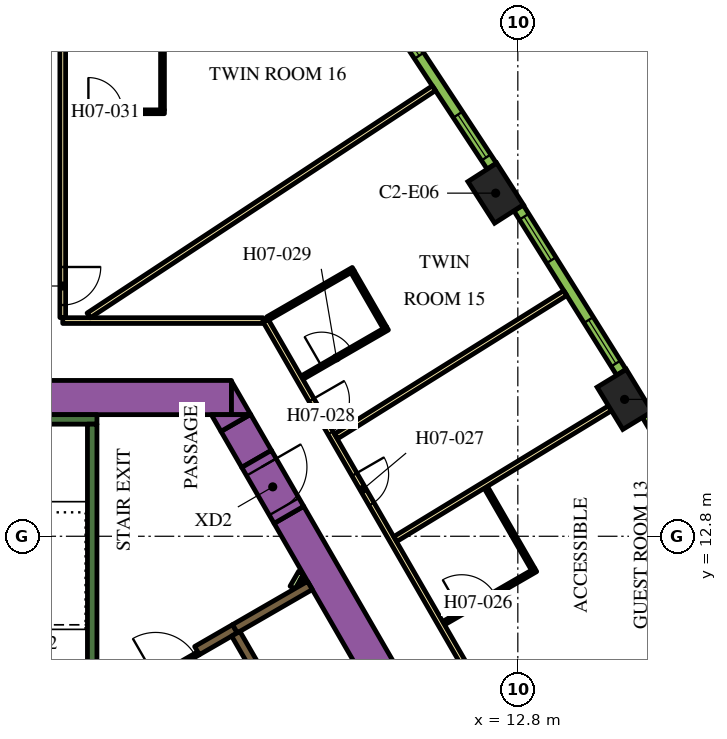
"""IFC4 building model, lengths in metres.
Left out: names, types, materials, properties, quantities, classifications, styles, units other than length and angle.
Written with IfcOpenShell. Run it as: python <this file> out.ifc"""

import sys

from ifc_helpers import new_model, si_unit, direction, frame, frame_2d, origin, origin_2d, place, context, subcontext, project, spatial, polyline, rectangle, outline, extrude, element, fill, save


model = new_model("IFC4")
c1 = context("Model", 3, precision=1e-05, world=origin(), true_north=direction((0.0, 1.0)))
c2 = subcontext(c1, "Body", "Model", "MODEL_VIEW")
j1 = project(units=[si_unit("LENGTHUNIT", "METRE"), si_unit("PLANEANGLEUNIT", "RADIAN")], contexts=[c1])
p1 = place(None, origin())
s1 = spatial("IfcSite", under=j1, at=p1, CompositionType="ELEMENT")
p2 = place(p1, origin())
s2 = spatial("IfcBuilding", under=s1, at=p2, CompositionType="ELEMENT")
p3 = place(p2, frame((0.0, 0.0, 99.3)))
s3 = spatial("IfcBuildingStorey", under=s2, at=p3, CompositionType="ELEMENT", Elevation=99.3)
for number, where, z_axis, x_axis in (
    (1, (15.609, 16.402, 0.0), (0.0, 0.0, 1.0), (-0.52, 0.854, 0.0)),
    (2, (12.217, 21.828, 0.0), (0.0, 0.0, 1.0), (-0.54, 0.842, 0.0)),
):
    element("IfcColumn", number, at=place(p3, frame(where, z_axis=z_axis, x_axis=x_axis)), inside=s3, PredefinedType="COLUMN", context=c2, shape_type="SweptSolid", body=[
        extrude(rectangle(XDim=1.3, YDim=0.9, at=origin_2d()), origin(), (0.0, 0.0, 1.0), 3.9),
    ])
p4 = place(p3, frame((6.776, 13.364, 0.0), z_axis=(0.0, 0.0, 1.0), x_axis=(0.500004177138, -0.8660229921, 0.0)))
e3 = element("IfcWall", 3, at=p4, inside=s3, PredefinedType="SOLIDWALL", context=c2, shape_type="SweptSolid", body=[
    extrude(rectangle(XDim=20.204, YDim=0.9, at=frame_2d((10.102, 0.0))), origin(), (0.0, 0.0, 1.0), 3.9),
])
p5 = place(p3, frame((-4.224, 16.45, 0.0), z_axis=(0.0, 0.0, 1.0), x_axis=(1.0, 0.0, 0.0)))
e4 = element("IfcWall", 4, at=p5, inside=s3, PredefinedType="SOLIDWALL", context=c2, shape_type="SweptSolid", body=[
    extrude(rectangle(XDim=9.488, YDim=0.9, at=frame_2d((4.744, 0.0))), origin(), (0.0, 0.0, 1.0), 3.9),
])
p6 = place(p3, origin())
e5 = element("IfcWall", 5, at=p6, inside=s3, PredefinedType="SOLIDWALL", context=c2, shape_type="SweptSolid", body=[
    extrude(outline(polyline([(5.265, 16.0), (5.265, 16.88), (5.773, 16.0), (5.265, 16.0)])), origin(), (0.0, 0.0, 1.0), 3.9),
])
p7 = place(p3, frame((5.926, 14.836, 0.0), z_axis=(0.0, 0.0, 1.0), x_axis=(-0.500076735116, 0.865981096212, 0.0)))
e6 = element("IfcWall", 6, at=p7, inside=s3, PredefinedType="SOLIDWALL", context=c2, shape_type="SweptSolid", body=[
    extrude(rectangle(XDim=1.094, YDim=0.9, at=frame_2d((0.547, 0.0))), origin(), (0.0, 0.0, 1.0), 3.9),
])
e7 = element("IfcWall", 7, at=p6, inside=s3, PredefinedType="SOLIDWALL", context=c2, shape_type="SweptSolid", body=[
    extrude(outline(polyline([(4.734, 16.0), (5.75, 16.0), (4.988, 15.56), (4.734, 16.0)])), origin(), (0.0, 0.0, 1.0), 3.9),
])
p8 = place(p3, frame((-1.725, 15.875, 0.0), z_axis=(0.0, 0.0, 1.0), x_axis=(1.0, 0.0, 0.0)))
e8 = element("IfcWall", 8, at=p8, inside=s3, PredefinedType="SOLIDWALL", context=c2, shape_type="SweptSolid", body=[
    extrude(rectangle(XDim=3.45, YDim=0.25, at=frame_2d((1.725, 0.0))), origin(), (0.0, 0.0, 1.0), 3.9),
])
p9 = place(p3, frame((1.6, 8.95, 0.0), z_axis=(0.0, 0.0, 1.0), x_axis=(0.0, 1.0, 0.0)))
e9 = element("IfcWall", 9, at=p9, inside=s3, PredefinedType="SOLIDWALL", context=c2, shape_type="SweptSolid", body=[
    extrude(rectangle(XDim=6.8, YDim=0.25, at=frame_2d((3.4, 0.0))), origin(), (0.0, 0.0, 1.0), 3.9),
])
p10 = place(p3, frame((4.358, 9.791, 0.0), z_axis=(0.0, 0.0, 1.0), x_axis=(0.866079547155, 0.499906209203, 0.0)))
e10 = element("IfcWall", 10, at=p10, inside=s3, PredefinedType="SOLIDWALL", context=c2, shape_type="SweptSolid", body=[
    extrude(rectangle(XDim=1.15, YDim=0.25, at=frame_2d((0.575, 0.0))), origin(), (0.0, 0.0, 1.0), 3.9),
])
p11 = place(p3, frame((5.356, 10.367, 0.0), z_axis=(0.0, 0.0, 1.0), x_axis=(0.865978535641, 0.50008116922, 0.0)))
e11 = element("IfcWall", 11, at=p11, inside=s3, PredefinedType="SOLIDWALL", context=c2, shape_type="SweptSolid", body=[
    extrude(rectangle(XDim=2.278, YDim=0.25, at=frame_2d((1.139, 0.0))), origin(), (0.0, 0.0, 1.0), 3.9),
])
p12 = place(p3, frame((6.872, 11.45, 0.0), z_axis=(0.0, 0.0, 1.0), x_axis=(0.499846793097, 0.866113839764, 0.0)))
e12 = element("IfcWall", 12, at=p12, inside=s3, PredefinedType="PARTITIONING", context=c2, shape_type="SweptSolid", body=[
    extrude(rectangle(XDim=0.453, YDim=0.15, at=frame_2d((0.227, 0.0))), origin(), (0.0, 0.0, 1.0), 2.75),
])
p13 = place(p3, frame((7.131, 11.6, 0.0), z_axis=(0.0, 0.0, 1.0), x_axis=(0.498600033135, 0.866832167699, 0.0)))
e13 = element("IfcWall", 13, at=p13, inside=s3, PredefinedType="PARTITIONING", context=c2, shape_type="SweptSolid", body=[
    extrude(rectangle(XDim=0.107, YDim=0.15, at=frame_2d((0.053, 0.0))), origin(), (0.0, 0.0, 1.0), 2.75),
])
p14 = place(p3, frame((11.553, -0.46, 0.0), z_axis=(0.0, 0.0, 1.0), x_axis=(-0.500006514828, 0.866021642414, 0.0)))
e14 = element("IfcWall", 14, at=p14, inside=s3, PredefinedType="SOLIDWALL", context=c2, shape_type="SweptSolid", body=[
    extrude(rectangle(XDim=12.35, YDim=0.25, at=frame_2d((6.175, 0.0))), origin(), (0.0, 0.0, 1.0), 3.9),
])
p15 = place(p14, frame((0.585, 0.0, 0.0)))
e15 = element("IfcOpeningElement", 15, at=p15, cuts=e14, PredefinedType="OPENING", context=c2, shape_type="SweptSolid", body=[
    extrude(rectangle(XDim=1.1, YDim=2.1, at=frame_2d((0.55, 1.05))), frame((0.0, 0.135, 0.0), z_axis=(0.0, -1.0, 0.0), x_axis=(1.0, 0.0, 0.0)), (0.0, 0.0, 1.0), 0.27),
])
p16 = place(p14, frame((3.105, 0.0, 0.0)))
e16 = element("IfcOpeningElement", 16, at=p16, cuts=e14, PredefinedType="OPENING", context=c2, shape_type="SweptSolid", body=[
    extrude(rectangle(XDim=1.1, YDim=2.1, at=frame_2d((0.55, 1.05))), frame((0.0, 0.135, 0.0), z_axis=(0.0, -1.0, 0.0), x_axis=(1.0, 0.0, 0.0)), (0.0, 0.0, 1.0), 0.27),
])
p17 = place(p14, frame((5.625, 0.0, 0.0)))
e17 = element("IfcOpeningElement", 17, at=p17, cuts=e14, PredefinedType="OPENING", context=c2, shape_type="SweptSolid", body=[
    extrude(rectangle(XDim=1.1, YDim=2.1, at=frame_2d((0.55, 1.05))), frame((0.0, 0.135, 0.0), z_axis=(0.0, -1.0, 0.0), x_axis=(1.0, 0.0, 0.0)), (0.0, 0.0, 1.0), 0.27),
])
p18 = place(p3, frame((3.183, 9.02, 0.0), z_axis=(0.0, 0.0, 1.0), x_axis=(0.866034573852, 0.49998411664, 0.0)))
e18 = element("IfcWall", 18, at=p18, inside=s3, PredefinedType="PARTITIONING", context=c2, shape_type="SweptSolid", body=[
    extrude(rectangle(XDim=1.4, YDim=0.09, at=frame_2d((0.7, 0.0))), origin(), (0.0, 0.0, 1.0), 2.75),
])
p19 = place(p18, frame((0.1, 0.0, 0.0)))
e19 = element("IfcOpeningElement", 19, at=p19, cuts=e18, PredefinedType="OPENING", context=c2, shape_type="SweptSolid", body=[
    extrude(rectangle(XDim=1.2, YDim=2.1, at=frame_2d((0.6, 1.05))), frame((0.0, 0.055, 0.0), z_axis=(0.0, -1.0, 0.0), x_axis=(1.0, 0.0, 0.0)), (0.0, 0.0, 1.0), 0.11),
])
p20 = place(p3, frame((5.926, 14.836, 0.0), z_axis=(0.0, 0.0, 1.0), x_axis=(0.500062241894, -0.865989465428, 0.0)))
e20 = element("IfcWall", 20, at=p20, inside=s3, PredefinedType="SOLIDWALL", context=c2, shape_type="SweptSolid", body=[
    extrude(rectangle(XDim=1.7, YDim=0.9, at=frame_2d((0.85, 0.0))), origin(), (0.0, 0.0, 1.0), 3.9),
])
p21 = place(p20, frame((0.25, 0.0, 0.0)))
e21 = element("IfcOpeningElement", 21, at=p21, cuts=e20, PredefinedType="OPENING", context=c2, shape_type="SweptSolid", body=[
    extrude(rectangle(XDim=1.2, YDim=2.1, at=frame_2d((0.6, 1.05))), frame((0.0, 0.46, 0.0), z_axis=(0.0, -1.0, 0.0), x_axis=(1.0, 0.0, 0.0)), (0.0, 0.0, 1.0), 0.92),
])
p22 = place(p3, frame((6.163, 18.475, 0.0), z_axis=(0.0, 0.0, 1.0), x_axis=(0.500001317485, -0.866024643133, 0.0)))
e22 = element("IfcWall", 22, at=p22, inside=s3, PredefinedType="PARTITIONING", context=c2, shape_type="SweptSolid", body=[
    extrude(rectangle(XDim=25.767, YDim=0.15, at=frame_2d((12.883, 0.0))), origin(), (0.0, 0.0, 1.0), 2.75),
])
p23 = place(p22, frame((24.241, 0.0, 0.0)))
e23 = element("IfcOpeningElement", 23, at=p23, cuts=e22, PredefinedType="OPENING", context=c2, shape_type="SweptSolid", body=[
    extrude(rectangle(XDim=1.0, YDim=2.1, at=frame_2d((0.5, 1.05))), frame((0.0, 0.085, 0.0), z_axis=(0.0, -1.0, 0.0), x_axis=(1.0, 0.0, 0.0)), (0.0, 0.0, 1.0), 0.17),
])
p24 = place(p22, frame((13.144, 0.0, 0.0)))
e24 = element("IfcOpeningElement", 24, at=p24, cuts=e22, PredefinedType="OPENING", context=c2, shape_type="SweptSolid", body=[
    extrude(rectangle(XDim=1.0, YDim=2.1, at=frame_2d((0.5, 1.05))), frame((0.0, 0.085, 0.0), z_axis=(0.0, -1.0, 0.0), x_axis=(1.0, 0.0, 0.0)), (0.0, 0.0, 1.0), 0.17),
])
p25 = place(p22, frame((11.592, 0.0, 0.0)))
e25 = element("IfcOpeningElement", 25, at=p25, cuts=e22, PredefinedType="OPENING", context=c2, shape_type="SweptSolid", body=[
    extrude(rectangle(XDim=1.1, YDim=2.1, at=frame_2d((0.55, 1.05))), frame((0.0, 0.085, 0.0), z_axis=(0.0, -1.0, 0.0), x_axis=(1.0, 0.0, 0.0)), (0.0, 0.0, 1.0), 0.17),
])
p26 = place(p22, frame((4.674, 0.0, 0.0)))
e26 = element("IfcOpeningElement", 26, at=p26, cuts=e22, PredefinedType="OPENING", context=c2, shape_type="SweptSolid", body=[
    extrude(rectangle(XDim=0.9, YDim=2.1, at=frame_2d((0.45, 1.05))), frame((0.0, 0.085, 0.0), z_axis=(0.0, -1.0, 0.0), x_axis=(1.0, 0.0, 0.0)), (0.0, 0.0, 1.0), 0.17),
])
p27 = place(p22, frame((2.411, 0.0, 0.0)))
e27 = element("IfcOpeningElement", 27, at=p27, cuts=e22, PredefinedType="OPENING", context=c2, shape_type="SweptSolid", body=[
    extrude(rectangle(XDim=1.0, YDim=2.1, at=frame_2d((0.5, 1.05))), frame((0.0, 0.085, 0.0), z_axis=(0.0, -1.0, 0.0), x_axis=(1.0, 0.0, 0.0)), (0.0, 0.0, 1.0), 0.17),
])
p28 = place(p3, frame((0.825, 18.475, 0.0), z_axis=(0.0, 0.0, 1.0), x_axis=(1.0, 0.0, 0.0)))
e28 = element("IfcWall", 28, at=p28, inside=s3, PredefinedType="PARTITIONING", context=c2, shape_type="SweptSolid", body=[
    extrude(rectangle(XDim=5.268, YDim=0.15, at=frame_2d((2.634, 0.0))), origin(), (0.0, 0.0, 1.0), 2.75),
])
p29 = place(p3, frame((0.825, 32.098, 0.0), z_axis=(0.0, 0.0, 1.0), x_axis=(0.0, -1.0, 0.0)))
e29 = element("IfcWall", 29, at=p29, inside=s3, PredefinedType="PARTITIONING", context=c2, shape_type="SweptSolid", body=[
    extrude(rectangle(XDim=13.543, YDim=0.15, at=frame_2d((6.772, 0.0))), origin(), (0.0, 0.0, 1.0), 2.75),
])
p30 = place(p29, frame((12.213, 0.0, 0.0)))
e30 = element("IfcOpeningElement", 30, at=p30, cuts=e29, PredefinedType="OPENING", context=c2, shape_type="SweptSolid", body=[
    extrude(rectangle(XDim=1.0, YDim=2.1, at=frame_2d((0.5, 1.05))), frame((0.0, 0.085, 0.0), z_axis=(0.0, -1.0, 0.0), x_axis=(1.0, 0.0, 0.0)), (0.0, 0.0, 1.0), 0.17),
])
p31 = place(p29, frame((4.65, 0.0, 0.0)))
e31 = element("IfcOpeningElement", 31, at=p31, cuts=e29, PredefinedType="OPENING", context=c2, shape_type="SweptSolid", body=[
    extrude(rectangle(XDim=1.0, YDim=2.1, at=frame_2d((0.5, 1.05))), frame((0.0, 0.085, 0.0), z_axis=(0.0, -1.0, 0.0), x_axis=(1.0, 0.0, 0.0)), (0.0, 0.0, 1.0), 0.17),
])
p32 = place(p3, frame((10.592, 24.589, 0.0), z_axis=(0.0, 0.0, 1.0), x_axis=(-0.835337323748, -0.549737715236, 0.0)))
e32 = element("IfcWall", 32, at=p32, inside=s3, PredefinedType="PARTITIONING", context=c2, shape_type="SweptSolid", body=[
    extrude(rectangle(XDim=10.875, YDim=0.15, at=frame_2d((5.438, 0.0))), origin(), (0.0, 0.0, 1.0), 2.75),
])
p33 = place(p3, frame((14.049, 19.2, 0.0), z_axis=(0.0, 0.0, 1.0), x_axis=(-0.847955867271, -0.530066832731, 0.0)))
e33 = element("IfcWall", 33, at=p33, inside=s3, PredefinedType="PARTITIONING", context=c2, shape_type="SweptSolid", body=[
    extrude(rectangle(XDim=7.111, YDim=0.15, at=frame_2d((3.556, 0.0))), origin(), (0.0, 0.0, 1.0), 2.75),
])
p34 = place(p3, frame((15.225, 16.167, 0.0), z_axis=(0.0, 0.0, 1.0), x_axis=(-0.854088713274, -0.520127359266, 0.0)))
e34 = element("IfcWall", 34, at=p34, inside=s3, PredefinedType="PARTITIONING", context=c2, shape_type="SweptSolid", body=[
    extrude(rectangle(XDim=6.611, YDim=0.15, at=frame_2d((3.305, 0.0))), origin(), (0.0, 0.0, 1.0), 2.75),
])
p35 = place(p3, frame((18.484, 10.672, 0.0), z_axis=(0.0, 0.0, 1.0), x_axis=(-0.866019162053, -0.50001081084, 0.0)))
e35 = element("IfcWall", 35, at=p35, inside=s3, PredefinedType="PARTITIONING", context=c2, shape_type="SweptSolid", body=[
    extrude(rectangle(XDim=6.694, YDim=0.15, at=frame_2d((3.347, 0.0))), origin(), (0.0, 0.0, 1.0), 2.75),
])
p36 = place(p3, frame((10.847, 10.513, 0.0), z_axis=(0.0, 0.0, 1.0), x_axis=(0.865996816683, 0.500049511043, 0.0)))
e36 = element("IfcWall", 36, at=p36, inside=s3, PredefinedType="PARTITIONING", context=c2, shape_type="SweptSolid", body=[
    extrude(rectangle(XDim=2.8, YDim=0.1, at=frame_2d((1.4, 0.0))), origin(), (0.0, 0.0, 1.0), 2.75),
])
p37 = place(p36, frame((0.55, 0.0, 0.0)))
e37 = element("IfcOpeningElement", 37, at=p37, cuts=e36, PredefinedType="OPENING", context=c2, shape_type="SweptSolid", body=[
    extrude(rectangle(XDim=1.0, YDim=2.1, at=frame_2d((0.5, 1.05))), frame((0.0, 0.06, 0.0), z_axis=(0.0, -1.0, 0.0), x_axis=(1.0, 0.0, 0.0)), (0.0, 0.0, 1.0), 0.12),
])
p38 = place(p3, frame((13.203, 11.931, 0.0), z_axis=(0.0, 0.0, 1.0), x_axis=(-0.499988411372, 0.866032094379, 0.0)))
e38 = element("IfcWall", 38, at=p38, inside=s3, PredefinedType="PARTITIONING", context=c2, shape_type="SweptSolid", body=[
    extrude(rectangle(XDim=2.49, YDim=0.1, at=frame_2d((1.245, 0.0))), origin(), (0.0, 0.0, 1.0), 2.75),
])
p39 = place(p3, frame((7.118, 16.971, 0.0), z_axis=(0.0, 0.0, 1.0), x_axis=(0.866021400173, 0.500006934395, 0.0)))
e39 = element("IfcWall", 39, at=p39, inside=s3, PredefinedType="PARTITIONING", context=c2, shape_type="SweptSolid", body=[
    extrude(rectangle(XDim=2.6, YDim=0.1, at=frame_2d((1.3, 0.0))), origin(), (0.0, 0.0, 1.0), 2.75),
])
p40 = place(p39, frame((0.6, 0.0, 0.0)))
e40 = element("IfcOpeningElement", 40, at=p40, cuts=e39, PredefinedType="OPENING", context=c2, shape_type="SweptSolid", body=[
    extrude(rectangle(XDim=0.9, YDim=2.1, at=frame_2d((0.45, 1.05))), frame((0.0, 0.06, 0.0), z_axis=(0.0, -1.0, 0.0), x_axis=(1.0, 0.0, 0.0)), (0.0, 0.0, 1.0), 0.12),
])
p41 = place(p3, frame((9.302, 18.289, 0.0), z_axis=(0.0, 0.0, 1.0), x_axis=(-0.500062241894, 0.865989465428, 0.0)))
e41 = element("IfcWall", 41, at=p41, inside=s3, PredefinedType="PARTITIONING", context=c2, shape_type="SweptSolid", body=[
    extrude(rectangle(XDim=1.7, YDim=0.1, at=frame_2d((0.85, 0.0))), origin(), (0.0, 0.0, 1.0), 2.75),
])
p42 = place(p3, frame((6.218, 18.53, 0.0), z_axis=(0.0, 0.0, 1.0), x_axis=(0.865997922154, 0.500047596559, 0.0)))
e42 = element("IfcWall", 42, at=p42, inside=s3, PredefinedType="PARTITIONING", context=c2, shape_type="SweptSolid", body=[
    extrude(rectangle(XDim=2.6, YDim=0.1, at=frame_2d((1.3, 0.0))), origin(), (0.0, 0.0, 1.0), 2.75),
])
p43 = place(p3, frame((0.9, 23.969, 0.0), z_axis=(0.0, 0.0, 1.0), x_axis=(1.0, 0.0, 0.0)))
e43 = element("IfcWall", 43, at=p43, inside=s3, PredefinedType="PARTITIONING", context=c2, shape_type="SweptSolid", body=[
    extrude(rectangle(XDim=2.6, YDim=0.1, at=frame_2d((1.3, 0.0))), origin(), (0.0, 0.0, 1.0), 2.75),
])
p44 = place(p43, frame((0.6, 0.0, 0.0)))
e44 = element("IfcOpeningElement", 44, at=p44, cuts=e43, PredefinedType="OPENING", context=c2, shape_type="SweptSolid", body=[
    extrude(rectangle(XDim=0.9, YDim=2.1, at=frame_2d((0.45, 1.05))), frame((0.0, 0.06, 0.0), z_axis=(0.0, -1.0, 0.0), x_axis=(1.0, 0.0, 0.0)), (0.0, 0.0, 1.0), 0.12),
])
p45 = place(p3, frame((3.45, 24.019, 0.0), z_axis=(0.0, 0.0, 1.0), x_axis=(0.0, 1.0, 0.0)))
e45 = element("IfcWall", 45, at=p45, inside=s3, PredefinedType="PARTITIONING", context=c2, shape_type="SweptSolid", body=[
    extrude(rectangle(XDim=1.7, YDim=0.1, at=frame_2d((0.85, 0.0))), origin(), (0.0, 0.0, 1.0), 2.75),
])
p46 = place(p3, frame((18.805, 11.611, 0.0), z_axis=(0.0, 0.0, 1.0), x_axis=(-0.510054281659, 0.860142214847, 0.0)))
e46 = element("IfcWall", 46, at=p46, inside=s3, PredefinedType="SOLIDWALL", context=c2, shape_type="SweptSolid", body=[
    extrude(rectangle(XDim=5.101, YDim=0.29, at=frame_2d((2.55, 0.0))), origin(), (0.0, 0.0, 1.0), 3.65),
])
p47 = place(p46, frame((0.273, 0.0, 0.9)))
e47 = element("IfcOpeningElement", 47, at=p47, cuts=e46, PredefinedType="OPENING", context=c2, shape_type="SweptSolid", body=[
    extrude(rectangle(XDim=1.35, YDim=2.15, at=frame_2d((0.675, 1.075))), frame((0.0, 0.155, 0.0), z_axis=(0.0, -1.0, 0.0), x_axis=(1.0, 0.0, 0.0)), (0.0, 0.0, 1.0), 0.31),
])
p48 = place(p46, frame((3.478, 0.0, 0.9)))
e48 = element("IfcOpeningElement", 48, at=p48, cuts=e46, PredefinedType="OPENING", context=c2, shape_type="SweptSolid", body=[
    extrude(rectangle(XDim=1.35, YDim=2.15, at=frame_2d((0.675, 1.075))), frame((0.0, 0.155, 0.0), z_axis=(0.0, -1.0, 0.0), x_axis=(1.0, 0.0, 0.0)), (0.0, 0.0, 1.0), 0.31),
])
p49 = place(p3, frame((15.524, 17.114, 0.0), z_axis=(0.0, 0.0, 1.0), x_axis=(-0.530072082134, 0.847952585787, 0.0)))
e49 = element("IfcWall", 49, at=p49, inside=s3, PredefinedType="SOLIDWALL", context=c2, shape_type="SweptSolid", body=[
    extrude(rectangle(XDim=5.1, YDim=0.29, at=frame_2d((2.55, 0.0))), origin(), (0.0, 0.0, 1.0), 3.65),
])
p50 = place(p49, frame((0.273, 0.0, 0.9)))
e50 = element("IfcOpeningElement", 50, at=p50, cuts=e49, PredefinedType="OPENING", context=c2, shape_type="SweptSolid", body=[
    extrude(rectangle(XDim=1.35, YDim=2.15, at=frame_2d((0.675, 1.075))), frame((0.0, 0.155, 0.0), z_axis=(0.0, -1.0, 0.0), x_axis=(1.0, 0.0, 0.0)), (0.0, 0.0, 1.0), 0.31),
])
p51 = place(p49, frame((3.478, 0.0, 0.9)))
e51 = element("IfcOpeningElement", 51, at=p51, cuts=e49, PredefinedType="OPENING", context=c2, shape_type="SweptSolid", body=[
    extrude(rectangle(XDim=1.35, YDim=2.15, at=frame_2d((0.675, 1.075))), frame((0.0, 0.155, 0.0), z_axis=(0.0, -1.0, 0.0), x_axis=(1.0, 0.0, 0.0)), (0.0, 0.0, 1.0), 0.31),
])
p52 = place(p3, frame((12.115, 22.539, 0.0), z_axis=(0.0, 0.0, 1.0), x_axis=(-0.549741341923, 0.835334937005, 0.0)))
e52 = element("IfcWall", 52, at=p52, inside=s3, PredefinedType="SOLIDWALL", context=c2, shape_type="SweptSolid", body=[
    extrude(rectangle(XDim=5.1, YDim=0.29, at=frame_2d((2.55, 0.0))), origin(), (0.0, 0.0, 1.0), 3.65),
])
p53 = place(p52, frame((0.273, 0.0, 0.9)))
e53 = element("IfcOpeningElement", 53, at=p53, cuts=e52, PredefinedType="OPENING", context=c2, shape_type="SweptSolid", body=[
    extrude(rectangle(XDim=1.35, YDim=2.15, at=frame_2d((0.675, 1.075))), frame((0.0, 0.155, 0.0), z_axis=(0.0, -1.0, 0.0), x_axis=(1.0, 0.0, 0.0)), (0.0, 0.0, 1.0), 0.31),
])
p54 = place(p52, frame((3.478, 0.0, 0.9)))
e54 = element("IfcOpeningElement", 54, at=p54, cuts=e52, PredefinedType="OPENING", context=c2, shape_type="SweptSolid", body=[
    extrude(rectangle(XDim=1.35, YDim=2.15, at=frame_2d((0.675, 1.075))), frame((0.0, 0.155, 0.0), z_axis=(0.0, -1.0, 0.0), x_axis=(1.0, 0.0, 0.0)), (0.0, 0.0, 1.0), 0.31),
])
p55 = place(p19, origin())
e55 = element("IfcDoor", 55, at=p55, inside=s3, OperationType="SINGLE_SWING_LEFT", PredefinedType="DOOR", context=c2, shape_type="SweptSolid", body=[
    extrude(rectangle(XDim=1.2, YDim=2.1, at=frame_2d((0.6, 1.05))), frame((0.0, 0.025, 0.0), z_axis=(0.0, -1.0, 0.0), x_axis=(1.0, 0.0, 0.0)), (0.0, 0.0, 1.0), 0.05),
])
fill(e19, e55)
p56 = place(p21, origin())
e56 = element("IfcDoor", 56, at=p56, inside=s3, OperationType="SINGLE_SWING_LEFT", PredefinedType="DOOR", context=c2, shape_type="SweptSolid", body=[
    extrude(rectangle(XDim=1.2, YDim=2.1, at=frame_2d((0.6, 1.05))), frame((0.0, 0.025, 0.0), z_axis=(0.0, -1.0, 0.0), x_axis=(1.0, 0.0, 0.0)), (0.0, 0.0, 1.0), 0.05),
])
fill(e21, e56)
p57 = place(p37, origin())
e57 = element("IfcDoor", 57, at=p57, inside=s3, OperationType="SINGLE_SWING_LEFT", PredefinedType="DOOR", context=c2, shape_type="SweptSolid", body=[
    extrude(rectangle(XDim=1.0, YDim=2.1, at=frame_2d((0.5, 1.05))), frame((0.0, 0.025, 0.0), z_axis=(0.0, -1.0, 0.0), x_axis=(1.0, 0.0, 0.0)), (0.0, 0.0, 1.0), 0.05),
])
fill(e37, e57)
p58 = place(p26, origin())
e58 = element("IfcDoor", 58, at=p58, inside=s3, OperationType="SINGLE_SWING_RIGHT", PredefinedType="DOOR", context=c2, shape_type="SweptSolid", body=[
    extrude(rectangle(XDim=0.9, YDim=2.1, at=frame_2d((0.45, 1.05))), frame((0.0, 0.025, 0.0), z_axis=(0.0, -1.0, 0.0), x_axis=(1.0, 0.0, 0.0)), (0.0, 0.0, 1.0), 0.05),
])
fill(e26, e58)
p59 = place(p27, origin())
e59 = element("IfcDoor", 59, at=p59, inside=s3, OperationType="SINGLE_SWING_RIGHT", PredefinedType="DOOR", context=c2, shape_type="SweptSolid", body=[
    extrude(rectangle(XDim=1.0, YDim=2.1, at=frame_2d((0.5, 1.05))), frame((0.0, 0.025, 0.0), z_axis=(0.0, -1.0, 0.0), x_axis=(1.0, 0.0, 0.0)), (0.0, 0.0, 1.0), 0.05),
])
fill(e27, e59)
p60 = place(p40, origin())
e60 = element("IfcDoor", 60, at=p60, inside=s3, OperationType="SINGLE_SWING_RIGHT", PredefinedType="DOOR", context=c2, shape_type="SweptSolid", body=[
    extrude(rectangle(XDim=0.9, YDim=2.1, at=frame_2d((0.45, 1.05))), frame((0.0, 0.025, 0.0), z_axis=(0.0, -1.0, 0.0), x_axis=(1.0, 0.0, 0.0)), (0.0, 0.0, 1.0), 0.05),
])
fill(e40, e60)
p61 = place(p30, origin())
e61 = element("IfcDoor", 61, at=p61, inside=s3, OperationType="SINGLE_SWING_RIGHT", PredefinedType="DOOR", context=c2, shape_type="SweptSolid", body=[
    extrude(rectangle(XDim=1.0, YDim=2.1, at=frame_2d((0.5, 1.05))), frame((0.0, 0.025, 0.0), z_axis=(0.0, -1.0, 0.0), x_axis=(1.0, 0.0, 0.0)), (0.0, 0.0, 1.0), 0.05),
])
fill(e30, e61)
p62 = place(p44, origin())
e62 = element("IfcDoor", 62, at=p62, inside=s3, OperationType="SINGLE_SWING_LEFT", PredefinedType="DOOR", context=c2, shape_type="SweptSolid", body=[
    extrude(rectangle(XDim=0.9, YDim=2.1, at=frame_2d((0.45, 1.05))), frame((0.0, 0.025, 0.0), z_axis=(0.0, -1.0, 0.0), x_axis=(1.0, 0.0, 0.0)), (0.0, 0.0, 1.0), 0.05),
])
fill(e44, e62)
p63 = place(p50, origin())
e63 = element("IfcWindow", 63, at=p63, inside=s3, PartitioningType="DOUBLE_PANEL_VERTICAL", PredefinedType="WINDOW", context=c2, shape_type="SweptSolid", body=[
    extrude(rectangle(XDim=1.35, YDim=2.15, at=frame_2d((0.675, 1.075))), frame((0.0, 0.015, 0.0), z_axis=(0.0, -1.0, 0.0), x_axis=(1.0, 0.0, 0.0)), (0.0, 0.0, 1.0), 0.06),
])
fill(e50, e63)
p64 = place(p51, origin())
e64 = element("IfcWindow", 64, at=p64, inside=s3, PartitioningType="DOUBLE_PANEL_VERTICAL", PredefinedType="WINDOW", context=c2, shape_type="SweptSolid", body=[
    extrude(rectangle(XDim=1.35, YDim=2.15, at=frame_2d((0.675, 1.075))), frame((0.0, 0.015, 0.0), z_axis=(0.0, -1.0, 0.0), x_axis=(1.0, 0.0, 0.0)), (0.0, 0.0, 1.0), 0.06),
])
fill(e51, e64)
p65 = place(p53, origin())
e65 = element("IfcWindow", 65, at=p65, inside=s3, PartitioningType="DOUBLE_PANEL_VERTICAL", PredefinedType="WINDOW", context=c2, shape_type="SweptSolid", body=[
    extrude(rectangle(XDim=1.35, YDim=2.15, at=frame_2d((0.675, 1.075))), frame((0.0, 0.015, 0.0), z_axis=(0.0, -1.0, 0.0), x_axis=(1.0, 0.0, 0.0)), (0.0, 0.0, 1.0), 0.06),
])
fill(e53, e65)
p66 = place(p54, origin())
e66 = element("IfcWindow", 66, at=p66, inside=s3, PartitioningType="DOUBLE_PANEL_VERTICAL", PredefinedType="WINDOW", context=c2, shape_type="SweptSolid", body=[
    extrude(rectangle(XDim=1.35, YDim=2.15, at=frame_2d((0.675, 1.075))), frame((0.0, 0.015, 0.0), z_axis=(0.0, -1.0, 0.0), x_axis=(1.0, 0.0, 0.0)), (0.0, 0.0, 1.0), 0.06),
])
fill(e54, e66)
save(model, sys.argv[1])
